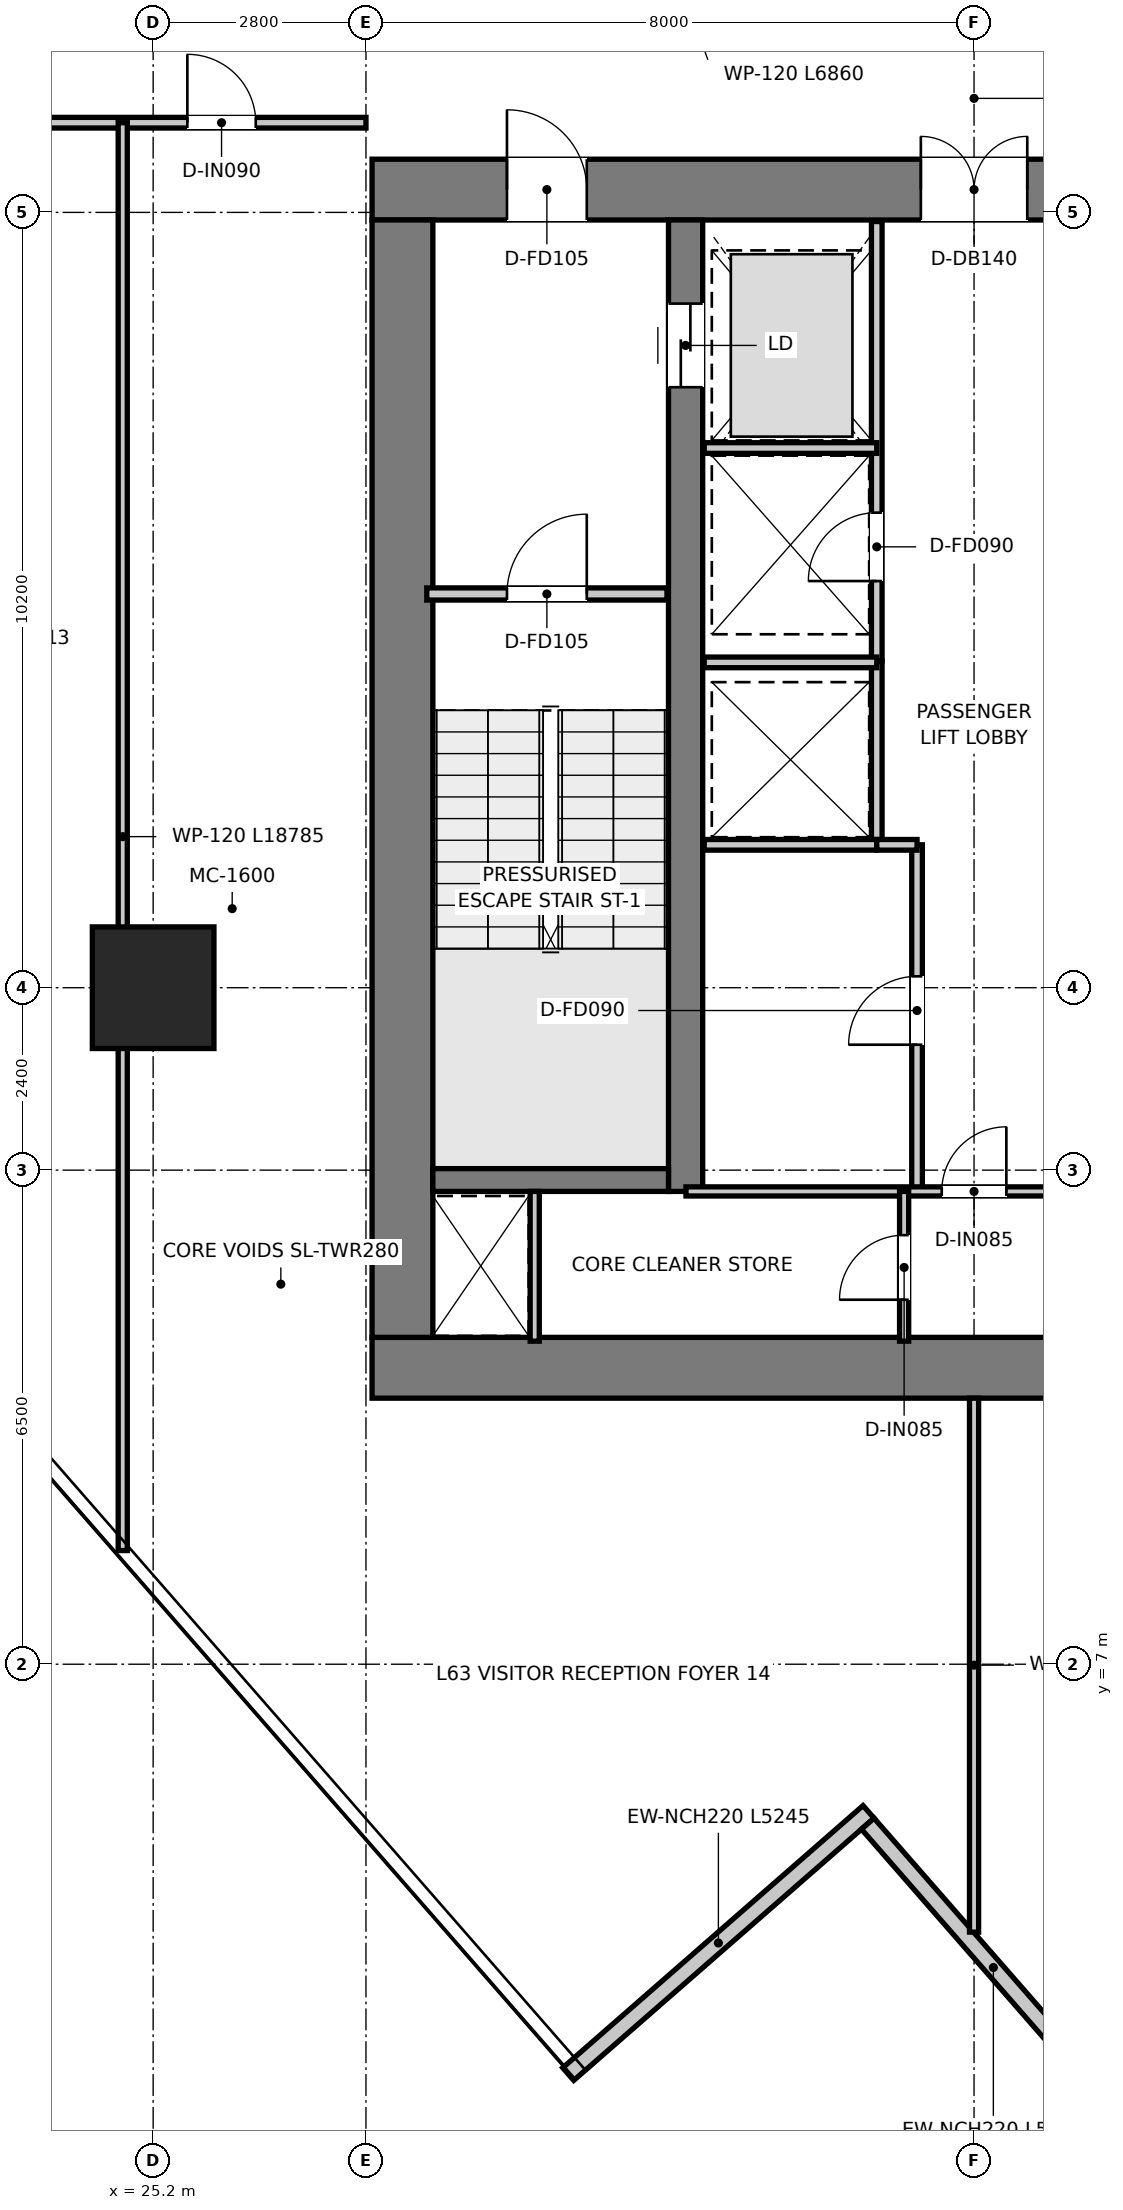
"""IFC4 building model, lengths in metres.
Left out: names, types, materials, properties, quantities, classifications, styles, units other than length and angle.
Written with IfcOpenShell. Run it as: python <this file> out.ifc"""

import sys

from ifc_helpers import new_model, si_unit, direction, frame, frame_2d, origin, origin_2d, place, context, subcontext, project, spatial, rectangle, extrude, source, transform, mapped, element, fill, save


model = new_model("IFC4")
c1 = context("Model", 3, precision=1e-05, world=origin(), true_north=direction((0.0, 1.0)))
c2 = subcontext(c1, "Body", "Model", "MODEL_VIEW")
j1 = project(units=[si_unit("LENGTHUNIT", "METRE"), si_unit("PLANEANGLEUNIT", "RADIAN")], contexts=[c1])
p1 = place(None, origin())
s1 = spatial("IfcSite", under=j1, at=p1, CompositionType="ELEMENT")
p2 = place(p1, origin())
s2 = spatial("IfcBuilding", under=s1, at=p2, CompositionType="ELEMENT")
p3 = place(p2, frame((0.0, 0.0, 258.65)))
s3 = spatial("IfcBuildingStorey", under=s2, at=p3, CompositionType="ELEMENT", Elevation=258.65)
p4 = place(p3, frame((28.08, 10.9, 0.0), z_axis=(0.0, 0.0, 1.0), x_axis=(1.0, 0.0, 0.0)))
e1 = element("IfcWall", 1, at=p4, inside=s3, PredefinedType="SHEAR", context=c2, shape_type="SweptSolid", body=[
    extrude(rectangle(XDim=15.84, YDim=0.8, at=frame_2d((7.92, 0.0))), origin(), (0.0, 0.0, 1.0), 3.95),
])
p5 = place(p3, frame((28.08, 26.4, 0.0), z_axis=(0.0, 0.0, 1.0), x_axis=(1.0, 0.0, 0.0)))
e2 = element("IfcWall", 2, at=p5, inside=s3, PredefinedType="SHEAR", context=c2, shape_type="SweptSolid", body=[
    extrude(rectangle(XDim=15.84, YDim=0.8, at=frame_2d((7.92, 0.0))), origin(), (0.0, 0.0, 1.0), 3.95),
])
p6 = place(p5, frame((7.22, 0.0, 0.0)))
e3 = element("IfcOpeningElement", 3, at=p6, cuts=e2, PredefinedType="OPENING", context=c2, shape_type="SweptSolid", body=[
    extrude(rectangle(XDim=1.4, YDim=2.2, at=frame_2d((0.7, 1.1))), frame((0.0, 0.41, 0.0), z_axis=(0.0, -1.0, 0.0), x_axis=(1.0, 0.0, 0.0)), (0.0, 0.0, 1.0), 0.82),
])
p7 = place(p5, frame((1.775, 0.0, 0.0)))
e4 = element("IfcOpeningElement", 4, at=p7, cuts=e2, PredefinedType="OPENING", context=c2, shape_type="SweptSolid", body=[
    extrude(rectangle(XDim=1.05, YDim=2.1, at=frame_2d((0.525, 1.05))), frame((0.0, 0.41, 0.0), z_axis=(0.0, -1.0, 0.0), x_axis=(1.0, 0.0, 0.0)), (0.0, 0.0, 1.0), 0.82),
])
p8 = place(p5, frame((13.015, 0.0, 0.0)))
e5 = element("IfcOpeningElement", 5, at=p8, cuts=e2, PredefinedType="OPENING", context=c2, shape_type="SweptSolid", body=[
    extrude(rectangle(XDim=1.05, YDim=2.1, at=frame_2d((0.525, 1.05))), frame((0.0, 0.41, 0.0), z_axis=(0.0, -1.0, 0.0), x_axis=(1.0, 0.0, 0.0)), (0.0, 0.0, 1.0), 0.82),
])
p9 = place(p3, frame((28.48, 11.3, 0.0), z_axis=(0.0, 0.0, 1.0), x_axis=(0.0, 1.0, 0.0)))
e6 = element("IfcWall", 6, at=p9, inside=s3, PredefinedType="SHEAR", context=c2, shape_type="SweptSolid", body=[
    extrude(rectangle(XDim=14.7, YDim=0.8, at=frame_2d((7.35, 0.0))), origin(), (0.0, 0.0, 1.0), 3.95),
])
p10 = place(p3, frame((32.205, 13.22, 0.0), z_axis=(0.0, 0.0, 1.0), x_axis=(0.0, 1.0, 0.0)))
e7 = element("IfcWall", 7, at=p10, inside=s3, PredefinedType="SHEAR", context=c2, shape_type="SweptSolid", body=[
    extrude(rectangle(XDim=12.78, YDim=0.45, at=frame_2d((6.39, 0.0))), origin(), (0.0, 0.0, 1.0), 3.95),
])
p11 = place(p10, frame((10.58, 0.0, 0.0)))
e8 = element("IfcOpeningElement", 8, at=p11, cuts=e7, PredefinedType="OPENING", context=c2, shape_type="SweptSolid", body=[
    extrude(rectangle(XDim=1.1, YDim=2.15, at=frame_2d((0.55, 1.075))), frame((0.0, 0.235, 0.0), z_axis=(0.0, -1.0, 0.0), x_axis=(1.0, 0.0, 0.0)), (0.0, 0.0, 1.0), 0.47),
])
p12 = place(p3, frame((28.88, 13.37, 0.0), z_axis=(0.0, 0.0, 1.0), x_axis=(1.0, 0.0, 0.0)))
e9 = element("IfcWall", 9, at=p12, inside=s3, PredefinedType="SHEAR", context=c2, shape_type="SweptSolid", body=[
    extrude(rectangle(XDim=3.1, YDim=0.3, at=frame_2d((1.55, 0.0))), origin(), (0.0, 0.0, 1.0), 3.95),
])
m1 = source(origin(), c2, "Body", "SweptSolid", [
    extrude(rectangle(XDim=1.6, YDim=1.6, at=origin_2d()), origin(), (0.0, 0.0, 1.0), 3.95),
])
p13 = place(p3, frame((25.2, 15.9, 0.0), z_axis=(0.0, 0.0, 1.0), x_axis=(1.0, 0.0, 0.0)))
e10 = element("IfcColumn", 10, at=p13, inside=s3, PredefinedType="USERDEFINED", context=c2, shape_type="MappedRepresentation", body=[
    mapped(m1, transform((0.0, 0.0, 0.0), x_axis=(1.0, 0.0, 0.0), y_axis=(0.0, 1.0, 0.0), z_axis=(0.0, 0.0, 1.0), scale=1.0)),
])
p14 = place(p3, frame((30.661, 1.608, 0.0), z_axis=(0.0, 0.0, 1.0), x_axis=(0.7532711863, 0.657710057617, 0.0)))
e11 = element("IfcWall", 11, at=p14, inside=s3, PredefinedType="ELEMENTEDWALL", context=c2, shape_type="SweptSolid", body=[
    extrude(rectangle(XDim=5.245, YDim=0.22, at=frame_2d((2.623, 0.0))), origin(), (0.0, 0.0, 1.0), 3.6),
])
p15 = place(p3, frame((34.602, 4.902, 0.0), z_axis=(0.0, 0.0, 1.0), x_axis=(0.657706226339, -0.753274531518, 0.0)))
e12 = element("IfcWall", 12, at=p15, inside=s3, PredefinedType="ELEMENTEDWALL", context=c2, shape_type="SweptSolid", body=[
    extrude(rectangle(XDim=5.025, YDim=0.22, at=frame_2d((2.512, 0.0))), origin(), (0.0, 0.0, 1.0), 3.6),
])
p16 = place(p3, frame((28.8, 21.08, 0.0), z_axis=(0.0, 0.0, 1.0), x_axis=(1.0, 0.0, 0.0)))
e13 = element("IfcWall", 13, at=p16, inside=s3, PredefinedType="PARTITIONING", context=c2, shape_type="SweptSolid", body=[
    extrude(rectangle(XDim=3.16, YDim=0.16, at=frame_2d((1.58, 0.0))), origin(), (0.0, 0.0, 1.0), 3.6),
])
p17 = place(p16, frame((1.055, 0.0, 0.0)))
e14 = element("IfcOpeningElement", 14, at=p17, cuts=e13, PredefinedType="OPENING", context=c2, shape_type="SweptSolid", body=[
    extrude(rectangle(XDim=1.05, YDim=2.1, at=frame_2d((0.525, 1.05))), frame((0.0, 0.09, 0.0), z_axis=(0.0, -1.0, 0.0), x_axis=(1.0, 0.0, 0.0)), (0.0, 0.0, 1.0), 0.18),
])
p18 = place(p3, frame((34.72, 20.2, 0.0), z_axis=(0.0, 0.0, 1.0), x_axis=(0.0, 1.0, 0.0)))
e15 = element("IfcWall", 15, at=p18, inside=s3, PredefinedType="PARTITIONING", context=c2, shape_type="SweptSolid", body=[
    extrude(rectangle(XDim=5.78, YDim=0.14, at=frame_2d((2.89, 0.0))), origin(), (0.0, 0.0, 1.0), 2.75),
])
p19 = place(p18, frame((1.05, 0.0, 0.0)))
e16 = element("IfcOpeningElement", 16, at=p19, cuts=e15, PredefinedType="OPENING", context=c2, shape_type="SweptSolid", body=[
    extrude(rectangle(XDim=0.9, YDim=2.1, at=frame_2d((0.45, 1.05))), frame((0.0, 0.08, 0.0), z_axis=(0.0, -1.0, 0.0), x_axis=(1.0, 0.0, 0.0)), (0.0, 0.0, 1.0), 0.16),
])
p20 = place(p3, frame((32.45, 23.0, 0.0), z_axis=(0.0, 0.0, 1.0), x_axis=(1.0, 0.0, 0.0)))
e17 = element("IfcWall", 17, at=p20, inside=s3, PredefinedType="PARTITIONING", context=c2, shape_type="SweptSolid", body=[
    extrude(rectangle(XDim=2.27, YDim=0.14, at=frame_2d((1.135, 0.0))), origin(), (0.0, 0.0, 1.0), 2.75),
])
p21 = place(p3, frame((34.72, 17.78, 0.0), z_axis=(0.0, 0.0, 1.0), x_axis=(0.0, 1.0, 0.0)))
e18 = element("IfcWall", 18, at=p21, inside=s3, PredefinedType="PARTITIONING", context=c2, shape_type="SweptSolid", body=[
    extrude(rectangle(XDim=2.42, YDim=0.14, at=frame_2d((1.21, 0.0))), origin(), (0.0, 0.0, 1.0), 3.6),
])
for number, where, z_axis, x_axis in (
    (19, (32.45, 17.78, 0.0), (0.0, 0.0, 1.0), (1.0, 0.0, 0.0)),
    (20, (32.45, 20.18, 0.0), (0.0, 0.0, 1.0), (1.0, 0.0, 0.0)),
):
    element("IfcWall", number, at=place(p3, frame(where, z_axis=z_axis, x_axis=x_axis)), inside=s3, PredefinedType="PARTITIONING", context=c2, shape_type="SweptSolid", body=[
        extrude(rectangle(XDim=2.27, YDim=0.14, at=frame_2d((1.135, 0.0))), origin(), (0.0, 0.0, 1.0), 3.6),
    ])
p22 = place(p3, frame((35.25, 13.22, 0.0), z_axis=(0.0, 0.0, 1.0), x_axis=(0.0, 1.0, 0.0)))
e21 = element("IfcWall", 21, at=p22, inside=s3, PredefinedType="PARTITIONING", context=c2, shape_type="SweptSolid", body=[
    extrude(rectangle(XDim=4.56, YDim=0.14, at=frame_2d((2.28, 0.0))), origin(), (0.0, 0.0, 1.0), 3.6),
])
p23 = place(p22, frame((1.93, 0.0, 0.0)))
e22 = element("IfcOpeningElement", 22, at=p23, cuts=e21, PredefinedType="OPENING", context=c2, shape_type="SweptSolid", body=[
    extrude(rectangle(XDim=0.9, YDim=2.1, at=frame_2d((0.45, 1.05))), frame((0.0, 0.08, 0.0), z_axis=(0.0, -1.0, 0.0), x_axis=(1.0, 0.0, 0.0)), (0.0, 0.0, 1.0), 0.16),
])
p24 = place(p3, frame((34.72, 17.78, 0.0), z_axis=(0.0, 0.0, 1.0), x_axis=(1.0, 0.0, 0.0)))
e23 = element("IfcWall", 23, at=p24, inside=s3, PredefinedType="PARTITIONING", context=c2, shape_type="SweptSolid", body=[
    extrude(rectangle(XDim=0.53, YDim=0.14, at=frame_2d((0.265, 0.0))), origin(), (0.0, 0.0, 1.0), 3.6),
])
p25 = place(p3, frame((30.22, 11.25, 0.0), z_axis=(0.0, 0.0, 1.0), x_axis=(0.0, 1.0, 0.0)))
e24 = element("IfcWall", 24, at=p25, inside=s3, PredefinedType="PARTITIONING", context=c2, shape_type="SweptSolid", body=[
    extrude(rectangle(XDim=1.97, YDim=0.12, at=frame_2d((0.985, 0.0))), origin(), (0.0, 0.0, 1.0), 3.6),
])
p26 = place(p3, frame((32.21, 13.22, 0.0), z_axis=(0.0, 0.0, 1.0), x_axis=(1.0, 0.0, 0.0)))
e25 = element("IfcWall", 25, at=p26, inside=s3, PredefinedType="PARTITIONING", context=c2, shape_type="SweptSolid", body=[
    extrude(rectangle(XDim=7.58, YDim=0.12, at=frame_2d((3.79, 0.0))), origin(), (0.0, 0.0, 1.0), 3.6),
])
p27 = place(p26, frame((3.365, 0.0, 0.0)))
e26 = element("IfcOpeningElement", 26, at=p27, cuts=e25, PredefinedType="OPENING", context=c2, shape_type="SweptSolid", body=[
    extrude(rectangle(XDim=0.85, YDim=2.1, at=frame_2d((0.425, 1.05))), frame((0.0, 0.07, 0.0), z_axis=(0.0, -1.0, 0.0), x_axis=(1.0, 0.0, 0.0)), (0.0, 0.0, 1.0), 0.14),
])
p28 = place(p3, frame((35.08, 11.25, 0.0), z_axis=(0.0, 0.0, 1.0), x_axis=(0.0, 1.0, 0.0)))
e27 = element("IfcWall", 27, at=p28, inside=s3, PredefinedType="PARTITIONING", context=c2, shape_type="SweptSolid", body=[
    extrude(rectangle(XDim=1.97, YDim=0.12, at=frame_2d((0.985, 0.0))), origin(), (0.0, 0.0, 1.0), 3.6),
])
p29 = place(p28, frame((0.545, 0.0, 0.0)))
e28 = element("IfcOpeningElement", 28, at=p29, cuts=e27, PredefinedType="OPENING", context=c2, shape_type="SweptSolid", body=[
    extrude(rectangle(XDim=0.85, YDim=2.1, at=frame_2d((0.425, 1.05))), frame((0.0, 0.07, 0.0), z_axis=(0.0, -1.0, 0.0), x_axis=(1.0, 0.0, 0.0)), (0.0, 0.0, 1.0), 0.14),
])
p30 = place(p3, frame((13.439, 27.28, 0.0), z_axis=(0.0, 0.0, 1.0), x_axis=(1.0, 0.0, 0.0)))
e29 = element("IfcWall", 29, at=p30, inside=s3, PredefinedType="PARTITIONING", context=c2, shape_type="SweptSolid", body=[
    extrude(rectangle(XDim=14.561, YDim=0.14, at=frame_2d((7.28, 0.0))), origin(), (0.0, 0.0, 1.0), 2.96),
])
p31 = place(p30, frame((1.347, 0.0, 0.0)))
e30 = element("IfcOpeningElement", 30, at=p31, cuts=e29, PredefinedType="OPENING", context=c2, shape_type="SweptSolid", body=[
    extrude(rectangle(XDim=0.9, YDim=2.1, at=frame_2d((0.45, 1.05))), frame((0.0, 0.08, 0.0), z_axis=(0.0, -1.0, 0.0), x_axis=(1.0, 0.0, 0.0)), (0.0, 0.0, 1.0), 0.16),
])
p32 = place(p30, frame((8.91, 0.0, 0.0)))
e31 = element("IfcOpeningElement", 31, at=p32, cuts=e29, PredefinedType="OPENING", context=c2, shape_type="SweptSolid", body=[
    extrude(rectangle(XDim=0.9, YDim=2.1, at=frame_2d((0.45, 1.05))), frame((0.0, 0.08, 0.0), z_axis=(0.0, -1.0, 0.0), x_axis=(1.0, 0.0, 0.0)), (0.0, 0.0, 1.0), 0.16),
])
p33 = place(p30, frame((12.21, 0.0, 0.0)))
e32 = element("IfcOpeningElement", 32, at=p33, cuts=e29, PredefinedType="OPENING", context=c2, shape_type="SweptSolid", body=[
    extrude(rectangle(XDim=0.9, YDim=2.1, at=frame_2d((0.45, 1.05))), frame((0.0, 0.08, 0.0), z_axis=(0.0, -1.0, 0.0), x_axis=(1.0, 0.0, 0.0)), (0.0, 0.0, 1.0), 0.16),
])
p34 = place(p3, frame((36.0, 3.475, 0.0), z_axis=(0.0, 0.0, 1.0), x_axis=(0.0, 1.0, 0.0)))
e33 = element("IfcWall", 33, at=p34, inside=s3, PredefinedType="PARTITIONING", context=c2, shape_type="SweptSolid", body=[
    extrude(rectangle(XDim=7.025, YDim=0.12, at=frame_2d((3.512, 0.0))), origin(), (0.0, 0.0, 1.0), 3.6),
])
p35 = place(p3, frame((24.8, 8.495, 0.0), z_axis=(0.0, 0.0, 1.0), x_axis=(0.0, 1.0, 0.0)))
e34 = element("IfcWall", 34, at=p35, inside=s3, PredefinedType="PARTITIONING", context=c2, shape_type="SweptSolid", body=[
    extrude(rectangle(XDim=18.785, YDim=0.12, at=frame_2d((9.392, 0.0))), origin(), (0.0, 0.0, 1.0), 3.11),
])
p36 = place(p17, origin())
e35 = element("IfcDoor", 35, at=p36, inside=s3, OperationType="SINGLE_SWING_RIGHT", PredefinedType="DOOR", context=c2, shape_type="SweptSolid", body=[
    extrude(rectangle(XDim=1.05, YDim=2.1, at=frame_2d((0.525, 1.05))), frame((0.0, 0.025, 0.0), z_axis=(0.0, -1.0, 0.0), x_axis=(1.0, 0.0, 0.0)), (0.0, 0.0, 1.0), 0.05),
])
fill(e14, e35)
p37 = place(p6, origin())
e36 = element("IfcDoor", 36, at=p37, inside=s3, OperationType="DOUBLE_DOOR_SINGLE_SWING", PredefinedType="DOOR", context=c2, shape_type="SweptSolid", body=[
    extrude(rectangle(XDim=1.4, YDim=2.2, at=frame_2d((0.7, 1.1))), frame((0.0, 0.025, 0.0), z_axis=(0.0, -1.0, 0.0), x_axis=(1.0, 0.0, 0.0)), (0.0, 0.0, 1.0), 0.05),
])
fill(e3, e36)
p38 = place(p7, origin())
e37 = element("IfcDoor", 37, at=p38, inside=s3, OperationType="SINGLE_SWING_LEFT", PredefinedType="DOOR", context=c2, shape_type="SweptSolid", body=[
    extrude(rectangle(XDim=1.05, YDim=2.1, at=frame_2d((0.525, 1.05))), frame((0.0, 0.025, 0.0), z_axis=(0.0, -1.0, 0.0), x_axis=(1.0, 0.0, 0.0)), (0.0, 0.0, 1.0), 0.05),
])
fill(e4, e37)
p39 = place(p11, origin())
e38 = element("IfcDoor", 38, at=p39, inside=s3, OperationType="DOUBLE_DOOR_SLIDING", PredefinedType="DOOR", context=c2, shape_type="SweptSolid", body=[
    extrude(rectangle(XDim=1.1, YDim=2.15, at=frame_2d((0.55, 1.075))), frame((0.0, 0.025, 0.0), z_axis=(0.0, -1.0, 0.0), x_axis=(1.0, 0.0, 0.0)), (0.0, 0.0, 1.0), 0.05),
])
fill(e8, e38)
p40 = place(p19, origin())
e39 = element("IfcDoor", 39, at=p40, inside=s3, OperationType="SINGLE_SWING_LEFT", PredefinedType="DOOR", context=c2, shape_type="SweptSolid", body=[
    extrude(rectangle(XDim=0.9, YDim=2.1, at=frame_2d((0.45, 1.05))), frame((0.0, 0.025, 0.0), z_axis=(0.0, -1.0, 0.0), x_axis=(1.0, 0.0, 0.0)), (0.0, 0.0, 1.0), 0.05),
])
fill(e16, e39)
p41 = place(p23, origin())
e40 = element("IfcDoor", 40, at=p41, inside=s3, OperationType="SINGLE_SWING_LEFT", PredefinedType="DOOR", context=c2, shape_type="SweptSolid", body=[
    extrude(rectangle(XDim=0.9, YDim=2.1, at=frame_2d((0.45, 1.05))), frame((0.0, 0.025, 0.0), z_axis=(0.0, -1.0, 0.0), x_axis=(1.0, 0.0, 0.0)), (0.0, 0.0, 1.0), 0.05),
])
fill(e22, e40)
p42 = place(p27, origin())
e41 = element("IfcDoor", 41, at=p42, inside=s3, OperationType="SINGLE_SWING_RIGHT", PredefinedType="DOOR", context=c2, shape_type="SweptSolid", body=[
    extrude(rectangle(XDim=0.85, YDim=2.1, at=frame_2d((0.425, 1.05))), frame((0.0, 0.025, 0.0), z_axis=(0.0, -1.0, 0.0), x_axis=(1.0, 0.0, 0.0)), (0.0, 0.0, 1.0), 0.05),
])
fill(e26, e41)
p43 = place(p29, origin())
e42 = element("IfcDoor", 42, at=p43, inside=s3, OperationType="SINGLE_SWING_LEFT", PredefinedType="DOOR", context=c2, shape_type="SweptSolid", body=[
    extrude(rectangle(XDim=0.85, YDim=2.1, at=frame_2d((0.425, 1.05))), frame((0.0, 0.025, 0.0), z_axis=(0.0, -1.0, 0.0), x_axis=(1.0, 0.0, 0.0)), (0.0, 0.0, 1.0), 0.05),
])
fill(e28, e42)
p44 = place(p33, origin())
e43 = element("IfcDoor", 43, at=p44, inside=s3, OperationType="SINGLE_SWING_LEFT", PredefinedType="DOOR", context=c2, shape_type="SweptSolid", body=[
    extrude(rectangle(XDim=0.9, YDim=2.1, at=frame_2d((0.45, 1.05))), frame((0.0, 0.025, 0.0), z_axis=(0.0, -1.0, 0.0), x_axis=(1.0, 0.0, 0.0)), (0.0, 0.0, 1.0), 0.05),
])
fill(e32, e43)
save(model, sys.argv[1])
